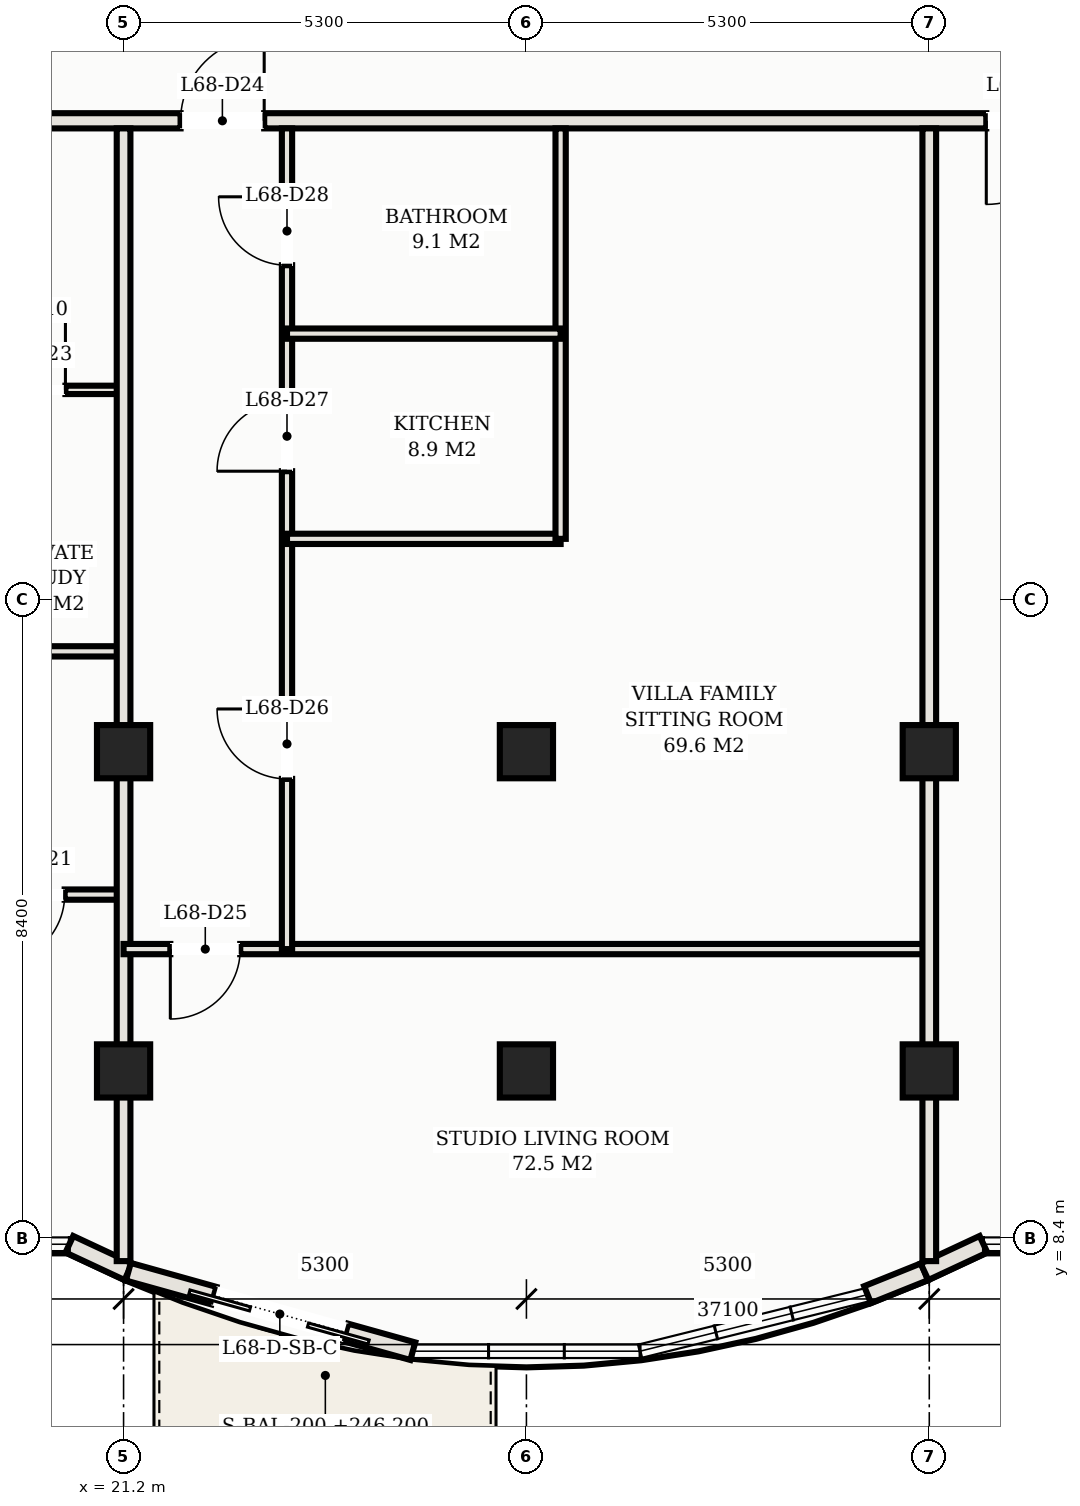
"""IFC4 building model, lengths in metres.
Left out: names, types, materials, properties, quantities, classifications, styles, units other than length and angle.
Written with IfcOpenShell. Run it as: python <this file> out.ifc"""

import sys

from ifc_helpers import new_model, si_unit, direction, frame, frame_2d, origin, origin_2d, place, context, subcontext, project, spatial, rectangle, hollow_rectangle, extrude, element, fill, save


model = new_model("IFC4")
c1 = context("Model", 3, precision=1e-05, world=origin(), true_north=direction((0.0, 1.0)))
c2 = subcontext(c1, "Body", "Model", "MODEL_VIEW")
j1 = project(units=[si_unit("LENGTHUNIT", "METRE"), si_unit("PLANEANGLEUNIT", "RADIAN")], contexts=[c1])
p1 = place(None, origin())
s1 = spatial("IfcSite", under=j1, at=p1, CompositionType="ELEMENT")
p2 = place(p1, origin())
s2 = spatial("IfcBuilding", under=s1, at=p2, CompositionType="ELEMENT")
p3 = place(p2, frame((0.0, 0.0, 246.2)))
s3 = spatial("IfcBuildingStorey", under=s2, at=p3, CompositionType="ELEMENT", Elevation=246.2)
for number, where, z_axis, x_axis in (
    (1, (21.2, 14.8, 0.0), (0.0, 0.0, 1.0), (1.0, 0.0, 0.0)),
    (2, (21.2, 10.6, 0.0), (0.0, 0.0, 1.0), (1.0, 0.0, 0.0)),
    (3, (26.5, 14.8, 0.0), (0.0, 0.0, 1.0), (1.0, 0.0, 0.0)),
    (4, (26.5, 10.6, 0.0), (0.0, 0.0, 1.0), (1.0, 0.0, 0.0)),
    (5, (31.8, 14.8, 0.0), (0.0, 0.0, 1.0), (1.0, 0.0, 0.0)),
    (6, (31.8, 10.6, 0.0), (0.0, 0.0, 1.0), (1.0, 0.0, 0.0)),
):
    element("IfcColumn", number, at=place(p3, frame(where, z_axis=z_axis, x_axis=x_axis)), inside=s3, PredefinedType="COLUMN", context=c2, shape_type="SweptSolid", body=[
        extrude(hollow_rectangle(XDim=0.7, YDim=0.7, WallThickness=0.025, at=origin_2d()), origin(), (0.0, 0.0, 1.0), 3.3),
    ])
p4 = place(p3, frame((20.487, 8.32, 0.0), z_axis=(0.0, 0.0, 1.0), x_axis=(0.906190424584, -0.422869855147, 0.0)))
e7 = element("IfcWall", 7, at=p4, inside=s3, PredefinedType="SOLIDWALL", context=c2, shape_type="SweptSolid", body=[
    extrude(rectangle(XDim=0.856, YDim=0.24, at=frame_2d((0.428, 0.0))), origin(), (0.0, 0.0, 1.0), 3.11),
])
p5 = place(p3, frame((21.263, 7.958, 0.0), z_axis=(0.0, 0.0, 1.0), x_axis=(0.963152398068, -0.268956238255, 0.0)))
e8 = element("IfcWall", 8, at=p5, inside=s3, PredefinedType="SOLIDWALL", context=c2, shape_type="SweptSolid", body=[
    extrude(rectangle(XDim=3.885, YDim=0.24, at=frame_2d((1.942, 0.0))), origin(), (0.0, 0.0, 1.0), 3.11),
])
p6 = place(p5, frame((1.169, 0.0, 0.0)))
e9 = element("IfcOpeningElement", 9, at=p6, cuts=e8, PredefinedType="OPENING", context=c2, shape_type="SweptSolid", body=[
    extrude(rectangle(XDim=1.8, YDim=2.2, at=frame_2d((0.9, 1.1))), frame((0.0, 0.13, 0.0), z_axis=(0.0, -1.0, 0.0), x_axis=(1.0, 0.0, 0.0)), (0.0, 0.0, 1.0), 0.26),
])
p7 = place(p3, frame((30.988, 7.657, 0.0), z_axis=(0.0, 0.0, 1.0), x_axis=(0.927870589467, 0.372902358805, 0.0)))
e10 = element("IfcWall", 10, at=p7, inside=s3, PredefinedType="SOLIDWALL", context=c2, shape_type="SweptSolid", body=[
    extrude(rectangle(XDim=0.807, YDim=0.24, at=frame_2d((0.404, 0.0))), origin(), (0.0, 0.0, 1.0), 3.11),
])
p8 = place(p3, frame((31.737, 7.958, 0.0), z_axis=(0.0, 0.0, 1.0), x_axis=(0.906190424584, 0.422869855147, 0.0)))
e11 = element("IfcWall", 11, at=p8, inside=s3, PredefinedType="SOLIDWALL", context=c2, shape_type="SweptSolid", body=[
    extrude(rectangle(XDim=0.856, YDim=0.24, at=frame_2d((0.428, 0.0))), origin(), (0.0, 0.0, 1.0), 3.11),
])
p9 = place(p3, frame((8.6, 23.1, 0.0), z_axis=(0.0, 0.0, 1.0), x_axis=(1.0, 0.0, 0.0)))
e12 = element("IfcWall", 12, at=p9, inside=s3, PredefinedType="PARTITIONING", context=c2, shape_type="SweptSolid", body=[
    extrude(rectangle(XDim=35.8, YDim=0.2, at=frame_2d((17.9, 0.0))), origin(), (0.0, 0.0, 1.0), 2.45),
])
p10 = place(p9, frame((2.75, 0.0, 0.0)))
e13 = element("IfcOpeningElement", 13, at=p10, cuts=e12, PredefinedType="OPENING", context=c2, shape_type="SweptSolid", body=[
    extrude(rectangle(XDim=1.1, YDim=2.25, at=frame_2d((0.55, 1.125))), frame((0.0, 0.11, 0.0), z_axis=(0.0, -1.0, 0.0), x_axis=(1.0, 0.0, 0.0)), (0.0, 0.0, 1.0), 0.22),
])
p11 = place(p9, frame((13.35, 0.0, 0.0)))
e14 = element("IfcOpeningElement", 14, at=p11, cuts=e12, PredefinedType="OPENING", context=c2, shape_type="SweptSolid", body=[
    extrude(rectangle(XDim=1.1, YDim=2.25, at=frame_2d((0.55, 1.125))), frame((0.0, 0.11, 0.0), z_axis=(0.0, -1.0, 0.0), x_axis=(1.0, 0.0, 0.0)), (0.0, 0.0, 1.0), 0.22),
])
p12 = place(p9, frame((23.95, 0.0, 0.0)))
e15 = element("IfcOpeningElement", 15, at=p12, cuts=e12, PredefinedType="OPENING", context=c2, shape_type="SweptSolid", body=[
    extrude(rectangle(XDim=1.1, YDim=2.25, at=frame_2d((0.55, 1.125))), frame((0.0, 0.11, 0.0), z_axis=(0.0, -1.0, 0.0), x_axis=(1.0, 0.0, 0.0)), (0.0, 0.0, 1.0), 0.22),
])
p13 = place(p9, frame((29.25, 0.0, 0.0)))
e16 = element("IfcOpeningElement", 16, at=p13, cuts=e12, PredefinedType="OPENING", context=c2, shape_type="SweptSolid", body=[
    extrude(rectangle(XDim=1.1, YDim=2.25, at=frame_2d((0.55, 1.125))), frame((0.0, 0.11, 0.0), z_axis=(0.0, -1.0, 0.0), x_axis=(1.0, 0.0, 0.0)), (0.0, 0.0, 1.0), 0.22),
])
p14 = place(p9, frame((0.505, 0.0, 0.0)))
e17 = element("IfcOpeningElement", 17, at=p14, cuts=e12, PredefinedType="OPENING", context=c2, shape_type="SweptSolid", body=[
    extrude(rectangle(XDim=0.9, YDim=2.15, at=frame_2d((0.45, 1.075))), frame((0.0, 0.11, 0.0), z_axis=(0.0, -1.0, 0.0), x_axis=(1.0, 0.0, 0.0)), (0.0, 0.0, 1.0), 0.22),
])
p15 = place(p9, frame((34.395, 0.0, 0.0)))
e18 = element("IfcOpeningElement", 18, at=p15, cuts=e12, PredefinedType="OPENING", context=c2, shape_type="SweptSolid", body=[
    extrude(rectangle(XDim=0.9, YDim=2.15, at=frame_2d((0.45, 1.075))), frame((0.0, 0.11, 0.0), z_axis=(0.0, -1.0, 0.0), x_axis=(1.0, 0.0, 0.0)), (0.0, 0.0, 1.0), 0.22),
])
p16 = place(p3, frame((16.6, 12.92, 0.0), z_axis=(0.0, 0.0, 1.0), x_axis=(1.0, 0.0, 0.0)))
e19 = element("IfcWall", 19, at=p16, inside=s3, PredefinedType="PARTITIONING", context=c2, shape_type="SweptSolid", body=[
    extrude(rectangle(XDim=4.6, YDim=0.135, at=frame_2d((2.3, 0.0))), origin(), (0.0, 0.0, 1.0), 2.45),
])
p17 = place(p16, frame((0.6, 0.0, 0.0)))
e20 = element("IfcOpeningElement", 20, at=p17, cuts=e19, PredefinedType="OPENING", context=c2, shape_type="SweptSolid", body=[
    extrude(rectangle(XDim=0.95, YDim=2.15, at=frame_2d((0.475, 1.075))), frame((0.0, 0.078, 0.0), z_axis=(0.0, -1.0, 0.0), x_axis=(1.0, 0.0, 0.0)), (0.0, 0.0, 1.0), 0.155),
])
p18 = place(p16, frame((2.925, 0.0, 0.0)))
e21 = element("IfcOpeningElement", 21, at=p18, cuts=e19, PredefinedType="OPENING", context=c2, shape_type="SweptSolid", body=[
    extrude(rectangle(XDim=0.9, YDim=2.15, at=frame_2d((0.45, 1.075))), frame((0.0, 0.078, 0.0), z_axis=(0.0, -1.0, 0.0), x_axis=(1.0, 0.0, 0.0)), (0.0, 0.0, 1.0), 0.155),
])
p19 = place(p3, frame((18.75, 16.12, 0.0), z_axis=(0.0, 0.0, 1.0), x_axis=(1.0, 0.0, 0.0)))
e22 = element("IfcWall", 22, at=p19, inside=s3, PredefinedType="PARTITIONING", context=c2, shape_type="SweptSolid", body=[
    extrude(rectangle(XDim=2.45, YDim=0.135, at=frame_2d((1.225, 0.0))), origin(), (0.0, 0.0, 1.0), 2.45),
])
p20 = place(p3, frame((18.75, 19.56, 0.0), z_axis=(0.0, 0.0, 1.0), x_axis=(1.0, 0.0, 0.0)))
e23 = element("IfcWall", 23, at=p20, inside=s3, PredefinedType="MOVABLE", context=c2, shape_type="SweptSolid", body=[
    extrude(rectangle(XDim=2.45, YDim=0.11, at=frame_2d((1.225, 0.0))), origin(), (0.0, 0.0, 1.0), 2.45),
])
p21 = place(p20, frame((0.765, 0.0, 0.0)))
e24 = element("IfcOpeningElement", 24, at=p21, cuts=e23, PredefinedType="OPENING", context=c2, shape_type="SweptSolid", body=[
    extrude(rectangle(XDim=0.92, YDim=2.15, at=frame_2d((0.46, 1.075))), frame((0.0, 0.065, 0.0), z_axis=(0.0, -1.0, 0.0), x_axis=(1.0, 0.0, 0.0)), (0.0, 0.0, 1.0), 0.13),
])
p22 = place(p3, frame((21.2, 8.098, 0.0), z_axis=(0.0, 0.0, 1.0), x_axis=(0.0, 1.0, 0.0)))
e25 = element("IfcWall", 25, at=p22, inside=s3, PredefinedType="PARTITIONING", context=c2, shape_type="SweptSolid", body=[
    extrude(rectangle(XDim=14.902, YDim=0.18, at=frame_2d((7.451, 0.0))), origin(), (0.0, 0.0, 1.0), 2.45),
])
p23 = place(p3, frame((21.2, 12.203, 0.0), z_axis=(0.0, 0.0, 1.0), x_axis=(1.0, 0.0, 0.0)))
e26 = element("IfcWall", 26, at=p23, inside=s3, PredefinedType="PARTITIONING", context=c2, shape_type="SweptSolid", body=[
    extrude(rectangle(XDim=10.6, YDim=0.135, at=frame_2d((5.3, 0.0))), origin(), (0.0, 0.0, 1.0), 2.45),
])
p24 = place(p23, frame((0.615, 0.0, 0.0)))
e27 = element("IfcOpeningElement", 27, at=p24, cuts=e26, PredefinedType="OPENING", context=c2, shape_type="SweptSolid", body=[
    extrude(rectangle(XDim=0.92, YDim=2.15, at=frame_2d((0.46, 1.075))), frame((0.0, 0.078, 0.0), z_axis=(0.0, -1.0, 0.0), x_axis=(1.0, 0.0, 0.0)), (0.0, 0.0, 1.0), 0.155),
])
p25 = place(p3, frame((23.35, 12.203, 0.0), z_axis=(0.0, 0.0, 1.0), x_axis=(0.0, 1.0, 0.0)))
e28 = element("IfcWall", 28, at=p25, inside=s3, PredefinedType="PARTITIONING", context=c2, shape_type="SweptSolid", body=[
    extrude(rectangle(XDim=10.797, YDim=0.135, at=frame_2d((5.398, 0.0))), origin(), (0.0, 0.0, 1.0), 2.45),
])
p26 = place(p25, frame((2.239, 0.0, 0.0)))
e29 = element("IfcOpeningElement", 29, at=p26, cuts=e28, PredefinedType="OPENING", context=c2, shape_type="SweptSolid", body=[
    extrude(rectangle(XDim=0.92, YDim=2.15, at=frame_2d((0.46, 1.075))), frame((0.0, 0.078, 0.0), z_axis=(0.0, -1.0, 0.0), x_axis=(1.0, 0.0, 0.0)), (0.0, 0.0, 1.0), 0.155),
])
p27 = place(p25, frame((6.287, 0.0, 0.0)))
e30 = element("IfcOpeningElement", 30, at=p27, cuts=e28, PredefinedType="OPENING", context=c2, shape_type="SweptSolid", body=[
    extrude(rectangle(XDim=0.92, YDim=2.15, at=frame_2d((0.46, 1.075))), frame((0.0, 0.078, 0.0), z_axis=(0.0, -1.0, 0.0), x_axis=(1.0, 0.0, 0.0)), (0.0, 0.0, 1.0), 0.155),
])
p28 = place(p25, frame((8.997, 0.0, 0.0)))
e31 = element("IfcOpeningElement", 31, at=p28, cuts=e28, PredefinedType="OPENING", context=c2, shape_type="SweptSolid", body=[
    extrude(rectangle(XDim=0.9, YDim=2.15, at=frame_2d((0.45, 1.075))), frame((0.0, 0.078, 0.0), z_axis=(0.0, -1.0, 0.0), x_axis=(1.0, 0.0, 0.0)), (0.0, 0.0, 1.0), 0.155),
])
p29 = place(p3, frame((23.35, 17.6, 0.0), z_axis=(0.0, 0.0, 1.0), x_axis=(1.0, 0.0, 0.0)))
e32 = element("IfcWall", 32, at=p29, inside=s3, PredefinedType="PARTITIONING", context=c2, shape_type="SweptSolid", body=[
    extrude(rectangle(XDim=3.6, YDim=0.135, at=frame_2d((1.8, 0.0))), origin(), (0.0, 0.0, 1.0), 2.45),
])
p30 = place(p3, frame((26.95, 17.6, 0.0), z_axis=(0.0, 0.0, 1.0), x_axis=(0.0, 1.0, 0.0)))
e33 = element("IfcWall", 33, at=p30, inside=s3, PredefinedType="PARTITIONING", context=c2, shape_type="SweptSolid", body=[
    extrude(rectangle(XDim=5.4, YDim=0.135, at=frame_2d((2.7, 0.0))), origin(), (0.0, 0.0, 1.0), 2.45),
])
p31 = place(p3, frame((23.35, 20.3, 0.0), z_axis=(0.0, 0.0, 1.0), x_axis=(1.0, 0.0, 0.0)))
e34 = element("IfcWall", 34, at=p31, inside=s3, PredefinedType="PARTITIONING", context=c2, shape_type="SweptSolid", body=[
    extrude(rectangle(XDim=3.6, YDim=0.135, at=frame_2d((1.8, 0.0))), origin(), (0.0, 0.0, 1.0), 2.45),
])
p32 = place(p3, frame((31.8, 8.098, 0.0), z_axis=(0.0, 0.0, 1.0), x_axis=(0.0, 1.0, 0.0)))
e35 = element("IfcWall", 35, at=p32, inside=s3, PredefinedType="PARTITIONING", context=c2, shape_type="SweptSolid", body=[
    extrude(rectangle(XDim=14.902, YDim=0.18, at=frame_2d((7.451, 0.0))), origin(), (0.0, 0.0, 1.0), 2.45),
])
p33 = place(p6, frame((1.8, 0.0, 0.0), z_axis=(0.0, 0.0, 1.0), x_axis=(-1.0, 0.0, 0.0)))
e36 = element("IfcDoor", 36, at=p33, inside=s3, OperationType="DOUBLE_DOOR_SLIDING", PredefinedType="DOOR", context=c2, shape_type="SweptSolid", body=[
    extrude(rectangle(XDim=1.8, YDim=2.2, at=frame_2d((0.9, 1.1))), frame((0.0, 0.025, 0.0), z_axis=(0.0, -1.0, 0.0), x_axis=(1.0, 0.0, 0.0)), (0.0, 0.0, 1.0), 0.05),
])
fill(e9, e36)
p34 = place(p18, frame((0.9, 0.0, 0.0), z_axis=(0.0, 0.0, 1.0), x_axis=(-1.0, 0.0, 0.0)))
e37 = element("IfcDoor", 37, at=p34, inside=s3, OperationType="SINGLE_SWING_RIGHT", PredefinedType="DOOR", context=c2, shape_type="SweptSolid", body=[
    extrude(rectangle(XDim=0.9, YDim=2.15, at=frame_2d((0.45, 1.075))), frame((0.0, 0.025, 0.0), z_axis=(0.0, -1.0, 0.0), x_axis=(1.0, 0.0, 0.0)), (0.0, 0.0, 1.0), 0.05),
])
fill(e21, e37)
p35 = place(p21, origin())
e38 = element("IfcDoor", 38, at=p35, inside=s3, OperationType="SINGLE_SWING_RIGHT", PredefinedType="DOOR", context=c2, shape_type="SweptSolid", body=[
    extrude(rectangle(XDim=0.92, YDim=2.15, at=frame_2d((0.46, 1.075))), frame((0.0, 0.025, 0.0), z_axis=(0.0, -1.0, 0.0), x_axis=(1.0, 0.0, 0.0)), (0.0, 0.0, 1.0), 0.05),
])
fill(e24, e38)
p36 = place(p11, origin())
e39 = element("IfcDoor", 39, at=p36, inside=s3, OperationType="SINGLE_SWING_RIGHT", PredefinedType="DOOR", context=c2, shape_type="SweptSolid", body=[
    extrude(rectangle(XDim=1.1, YDim=2.25, at=frame_2d((0.55, 1.125))), frame((0.0, 0.025, 0.0), z_axis=(0.0, -1.0, 0.0), x_axis=(1.0, 0.0, 0.0)), (0.0, 0.0, 1.0), 0.05),
])
fill(e14, e39)
p37 = place(p24, frame((0.92, 0.0, 0.0), z_axis=(0.0, 0.0, 1.0), x_axis=(-1.0, 0.0, 0.0)))
e40 = element("IfcDoor", 40, at=p37, inside=s3, OperationType="SINGLE_SWING_RIGHT", PredefinedType="DOOR", context=c2, shape_type="SweptSolid", body=[
    extrude(rectangle(XDim=0.92, YDim=2.15, at=frame_2d((0.46, 1.075))), frame((0.0, 0.025, 0.0), z_axis=(0.0, -1.0, 0.0), x_axis=(1.0, 0.0, 0.0)), (0.0, 0.0, 1.0), 0.05),
])
fill(e27, e40)
p38 = place(p26, origin())
e41 = element("IfcDoor", 41, at=p38, inside=s3, OperationType="SINGLE_SWING_RIGHT", PredefinedType="DOOR", context=c2, shape_type="SweptSolid", body=[
    extrude(rectangle(XDim=0.92, YDim=2.15, at=frame_2d((0.46, 1.075))), frame((0.0, 0.025, 0.0), z_axis=(0.0, -1.0, 0.0), x_axis=(1.0, 0.0, 0.0)), (0.0, 0.0, 1.0), 0.05),
])
fill(e29, e41)
p39 = place(p27, origin())
e42 = element("IfcDoor", 42, at=p39, inside=s3, OperationType="SINGLE_SWING_LEFT", PredefinedType="DOOR", context=c2, shape_type="SweptSolid", body=[
    extrude(rectangle(XDim=0.92, YDim=2.15, at=frame_2d((0.46, 1.075))), frame((0.0, 0.025, 0.0), z_axis=(0.0, -1.0, 0.0), x_axis=(1.0, 0.0, 0.0)), (0.0, 0.0, 1.0), 0.05),
])
fill(e30, e42)
p40 = place(p28, origin())
e43 = element("IfcDoor", 43, at=p40, inside=s3, OperationType="SINGLE_SWING_RIGHT", PredefinedType="DOOR", context=c2, shape_type="SweptSolid", body=[
    extrude(rectangle(XDim=0.9, YDim=2.15, at=frame_2d((0.45, 1.075))), frame((0.0, 0.025, 0.0), z_axis=(0.0, -1.0, 0.0), x_axis=(1.0, 0.0, 0.0)), (0.0, 0.0, 1.0), 0.05),
])
fill(e31, e43)
p41 = place(p12, frame((1.1, 0.0, 0.0), z_axis=(0.0, 0.0, 1.0), x_axis=(-1.0, 0.0, 0.0)))
e44 = element("IfcDoor", 44, at=p41, inside=s3, OperationType="SINGLE_SWING_RIGHT", PredefinedType="DOOR", context=c2, shape_type="SweptSolid", body=[
    extrude(rectangle(XDim=1.1, YDim=2.25, at=frame_2d((0.55, 1.125))), frame((0.0, 0.025, 0.0), z_axis=(0.0, -1.0, 0.0), x_axis=(1.0, 0.0, 0.0)), (0.0, 0.0, 1.0), 0.05),
])
fill(e15, e44)
save(model, sys.argv[1])
